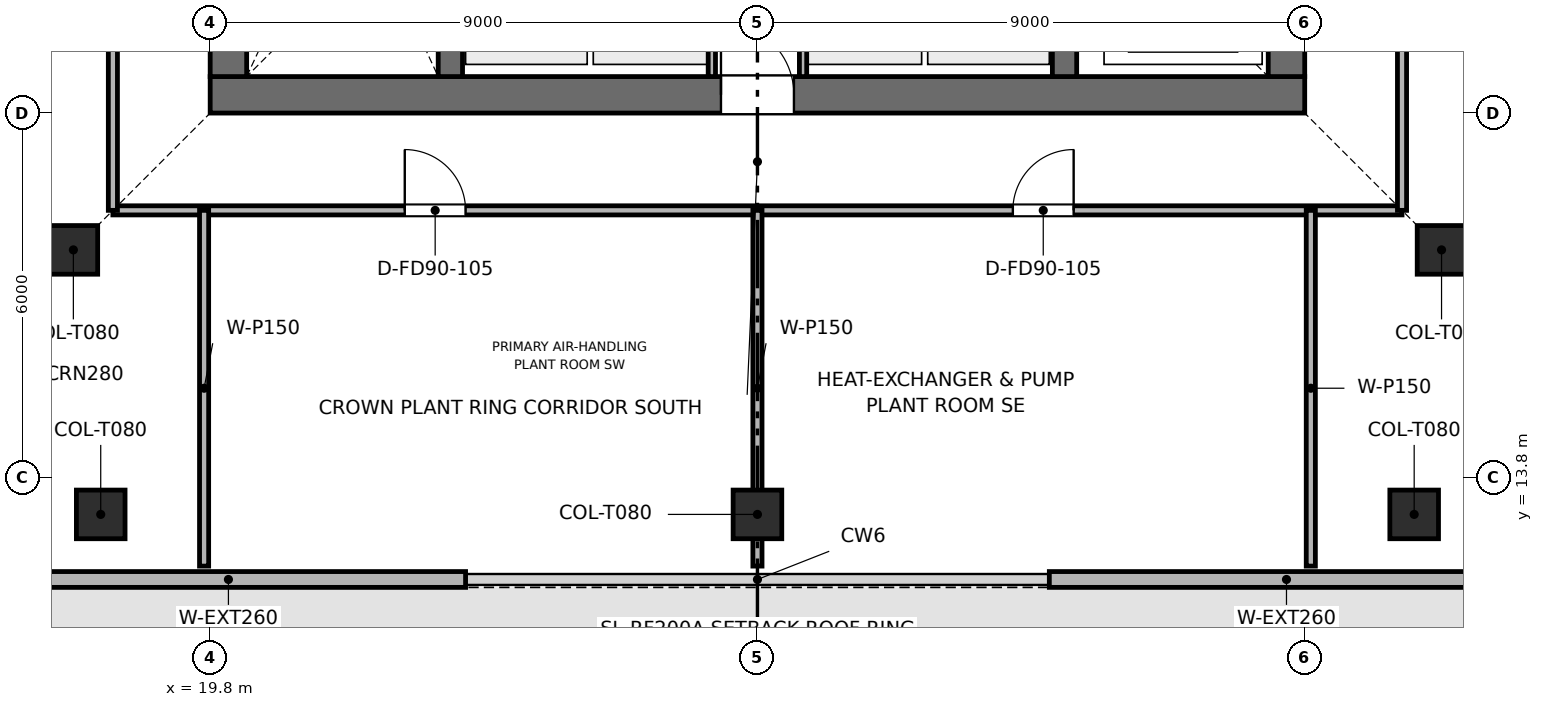
"""IFC4 building model, lengths in metres.
Left out: names, types, materials, properties, quantities, classifications, styles, units other than length and angle.
Written with IfcOpenShell. Run it as: python <this file> out.ifc"""

import sys

from ifc_helpers import new_model, si_unit, direction, frame, frame_2d, origin, origin_2d, place, context, subcontext, project, spatial, rectangle, extrude, element, fill, save


model = new_model("IFC4")
c1 = context("Model", 3, precision=1e-05, world=origin(), true_north=direction((0.0, 1.0)))
c2 = subcontext(c1, "Body", "Model", "MODEL_VIEW")
j1 = project(units=[si_unit("LENGTHUNIT", "METRE"), si_unit("PLANEANGLEUNIT", "RADIAN")], contexts=[c1])
p1 = place(None, origin())
s1 = spatial("IfcSite", under=j1, at=p1, CompositionType="ELEMENT")
p2 = place(p1, origin())
s2 = spatial("IfcBuilding", under=s1, at=p2, CompositionType="ELEMENT")
p3 = place(p2, frame((0.0, 0.0, 373.8)))
s3 = spatial("IfcBuildingStorey", under=s2, at=p3, CompositionType="ELEMENT", Elevation=373.8)
p4 = place(p3, frame((19.8, 20.1, 0.0), z_axis=(0.0, 0.0, 1.0), x_axis=(1.0, 0.0, 0.0)))
e1 = element("IfcWall", 1, at=p4, inside=s3, PredefinedType="SHEAR", context=c2, shape_type="SweptSolid", body=[
    extrude(rectangle(XDim=18.0, YDim=0.6, at=frame_2d((9.0, 0.0))), origin(), (0.0, 0.0, 1.0), 4.8),
])
p5 = place(p4, frame((8.4, 0.0, 0.0)))
e2 = element("IfcOpeningElement", 2, at=p5, cuts=e1, PredefinedType="OPENING", context=c2, shape_type="SweptSolid", body=[
    extrude(rectangle(XDim=1.2, YDim=2.2, at=frame_2d((0.6, 1.1))), frame((0.0, 0.31, 0.0), z_axis=(0.0, -1.0, 0.0), x_axis=(1.0, 0.0, 0.0)), (0.0, 0.0, 1.0), 0.62),
])
p6 = place(p3, frame((20.1, 20.4, 0.0), z_axis=(0.0, 0.0, 1.0), x_axis=(0.0, 1.0, 0.0)))
e3 = element("IfcWall", 3, at=p6, inside=s3, PredefinedType="SHEAR", context=c2, shape_type="SweptSolid", body=[
    extrude(rectangle(XDim=16.8, YDim=0.6, at=frame_2d((8.4, 0.0))), origin(), (0.0, 0.0, 1.0), 4.8),
])
p7 = place(p6, frame((10.4, 0.0, 0.0)))
e4 = element("IfcOpeningElement", 4, at=p7, cuts=e3, PredefinedType="OPENING", context=c2, shape_type="SweptSolid", body=[
    extrude(rectangle(XDim=1.1, YDim=2.15, at=frame_2d((0.55, 1.075))), frame((0.0, 0.31, 0.0), z_axis=(0.0, -1.0, 0.0), x_axis=(1.0, 0.0, 0.0)), (0.0, 0.0, 1.0), 0.62),
])
p8 = place(p3, frame((37.5, 20.4, 0.0), z_axis=(0.0, 0.0, 1.0), x_axis=(0.0, 1.0, 0.0)))
e5 = element("IfcWall", 5, at=p8, inside=s3, PredefinedType="SHEAR", context=c2, shape_type="SweptSolid", body=[
    extrude(rectangle(XDim=16.8, YDim=0.6, at=frame_2d((8.4, 0.0))), origin(), (0.0, 0.0, 1.0), 4.8),
])
p9 = place(p8, frame((4.9, 0.0, 0.0)))
e6 = element("IfcOpeningElement", 6, at=p9, cuts=e5, PredefinedType="OPENING", context=c2, shape_type="SweptSolid", body=[
    extrude(rectangle(XDim=1.1, YDim=2.15, at=frame_2d((0.55, 1.075))), frame((0.0, 0.31, 0.0), z_axis=(0.0, -1.0, 0.0), x_axis=(1.0, 0.0, 0.0)), (0.0, 0.0, 1.0), 0.62),
])
for number, where, z_axis, x_axis in (
    (7, (23.75, 20.4, 0.0), (0.0, 0.0, 1.0), (0.0, 1.0, 0.0)),
    (8, (33.85, 20.4, 0.0), (0.0, 0.0, 1.0), (0.0, 1.0, 0.0)),
):
    element("IfcWall", number, at=place(p3, frame(where, z_axis=z_axis, x_axis=x_axis)), inside=s3, PredefinedType="SHEAR", context=c2, shape_type="SweptSolid", body=[
        extrude(rectangle(XDim=16.8, YDim=0.4, at=frame_2d((8.4, 0.0))), origin(), (0.0, 0.0, 1.0), 4.8),
    ])
for number, where, z_axis, x_axis in (
    (9, (18.0, 13.2, 0.003), (0.0, 0.0, 1.0), (1.0, 0.0, 0.0)),
    (10, (28.8, 13.2, 0.003), (0.0, 0.0, 1.0), (1.0, 0.0, 0.0)),
    (11, (39.6, 13.2, 0.003), (0.0, 0.0, 1.0), (1.0, 0.0, 0.0)),
    (12, (17.55, 17.55, 0.003), (0.0, 0.0, 1.0), (1.0, 0.0, 0.0)),
    (13, (40.05, 17.55, 0.003), (0.0, 0.0, 1.0), (1.0, 0.0, 0.0)),
):
    element("IfcColumn", number, at=place(p3, frame(where, z_axis=z_axis, x_axis=x_axis)), inside=s3, PredefinedType="COLUMN", context=c2, shape_type="SweptSolid", body=[
        extrude(rectangle(XDim=0.8, YDim=0.8, at=origin_2d()), origin(), (0.0, 0.0, 1.0), 4.494),
    ])
p10 = place(p3, frame((41.4, 12.13, 0.0), z_axis=(0.0, 0.0, 1.0), x_axis=(-1.0, 0.0, 0.0)))
e14 = element("IfcWall", 14, at=p10, inside=s3, PredefinedType="SOLIDWALL", context=c2, shape_type="SweptSolid", body=[
    extrude(rectangle(XDim=7.8, YDim=0.26, at=frame_2d((3.9, 0.0))), origin(), (0.0, 0.0, 1.0), 4.5),
])
p11 = place(p3, frame((24.0, 12.13, 0.0), z_axis=(0.0, 0.0, 1.0), x_axis=(-1.0, 0.0, 0.0)))
e15 = element("IfcWall", 15, at=p11, inside=s3, PredefinedType="SOLIDWALL", context=c2, shape_type="SweptSolid", body=[
    extrude(rectangle(XDim=7.8, YDim=0.26, at=frame_2d((3.9, 0.0))), origin(), (0.0, 0.0, 1.0), 4.5),
])
p12 = place(p3, frame((28.05, 20.4, 0.0), z_axis=(0.0, 0.0, 1.0), x_axis=(0.0, 1.0, 0.0)))
e16 = element("IfcWall", 16, at=p12, inside=s3, PredefinedType="PARTITIONING", context=c2, shape_type="SweptSolid", body=[
    extrude(rectangle(XDim=8.15, YDim=0.12, at=frame_2d((4.075, 0.0))), origin(), (0.0, 0.0, 1.0), 4.5),
])
p13 = place(p3, frame((29.55, 20.4, 0.0), z_axis=(0.0, 0.0, 1.0), x_axis=(0.0, 1.0, 0.0)))
e17 = element("IfcWall", 17, at=p13, inside=s3, PredefinedType="PARTITIONING", context=c2, shape_type="SweptSolid", body=[
    extrude(rectangle(XDim=2.75, YDim=0.12, at=frame_2d((1.375, 0.0))), origin(), (0.0, 0.0, 1.0), 4.5),
])
p14 = place(p3, frame((18.2, 18.2, 0.0), z_axis=(0.0, 0.0, 1.0), x_axis=(1.0, 0.0, 0.0)))
e18 = element("IfcWall", 18, at=p14, inside=s3, PredefinedType="PARTITIONING", context=c2, shape_type="SweptSolid", body=[
    extrude(rectangle(XDim=21.2, YDim=0.15, at=frame_2d((10.6, 0.0))), origin(), (0.0, 0.0, 1.0), 4.035),
])
p15 = place(p14, frame((4.8, 0.0, 0.0)))
e19 = element("IfcOpeningElement", 19, at=p15, cuts=e18, PredefinedType="OPENING", context=c2, shape_type="SweptSolid", body=[
    extrude(rectangle(XDim=1.0, YDim=2.15, at=frame_2d((0.5, 1.075))), frame((0.0, 0.085, 0.0), z_axis=(0.0, -1.0, 0.0), x_axis=(1.0, 0.0, 0.0)), (0.0, 0.0, 1.0), 0.17),
])
p16 = place(p14, frame((14.8, 0.0, 0.0)))
e20 = element("IfcOpeningElement", 20, at=p16, cuts=e18, PredefinedType="OPENING", context=c2, shape_type="SweptSolid", body=[
    extrude(rectangle(XDim=1.0, YDim=2.15, at=frame_2d((0.5, 1.075))), frame((0.0, 0.085, 0.0), z_axis=(0.0, -1.0, 0.0), x_axis=(1.0, 0.0, 0.0)), (0.0, 0.0, 1.0), 0.17),
])
for number, where, z_axis, x_axis in (
    (21, (18.2, 18.2, 0.0), (0.0, 0.0, 1.0), (0.0, 1.0, 0.0)),
    (22, (39.4, 18.2, 0.0), (0.0, 0.0, 1.0), (0.0, 1.0, 0.0)),
):
    element("IfcWall", number, at=place(p3, frame(where, z_axis=z_axis, x_axis=x_axis)), inside=s3, PredefinedType="PARTITIONING", context=c2, shape_type="SweptSolid", body=[
        extrude(rectangle(XDim=21.2, YDim=0.15, at=frame_2d((10.6, 0.0))), origin(), (0.0, 0.0, 1.0), 4.035),
    ])
p17 = place(p3, frame((19.7, 12.35, 0.0), z_axis=(0.0, 0.0, 1.0), x_axis=(0.0, 1.0, 0.0)))
e23 = element("IfcWall", 23, at=p17, inside=s3, PredefinedType="PARTITIONING", context=c2, shape_type="SweptSolid", body=[
    extrude(rectangle(XDim=5.85, YDim=0.15, at=frame_2d((2.925, 0.0))), origin(), (0.0, 0.0, 1.0), 4.185),
])
p18 = place(p3, frame((28.8, 12.35, 0.0), z_axis=(0.0, 0.0, 1.0), x_axis=(0.0, 1.0, 0.0)))
e24 = element("IfcWall", 24, at=p18, inside=s3, PredefinedType="PARTITIONING", context=c2, shape_type="SweptSolid", body=[
    extrude(rectangle(XDim=5.85, YDim=0.15, at=frame_2d((2.925, 0.0))), origin(), (0.0, 0.0, 1.0), 4.035),
])
p19 = place(p3, frame((37.9, 12.35, 0.0), z_axis=(0.0, 0.0, 1.0), x_axis=(0.0, 1.0, 0.0)))
e25 = element("IfcWall", 25, at=p19, inside=s3, PredefinedType="PARTITIONING", context=c2, shape_type="SweptSolid", body=[
    extrude(rectangle(XDim=5.85, YDim=0.15, at=frame_2d((2.925, 0.0))), origin(), (0.0, 0.0, 1.0), 4.185),
])
p20 = place(p15, origin())
e26 = element("IfcDoor", 26, at=p20, inside=s3, OperationType="SINGLE_SWING_LEFT", PredefinedType="DOOR", context=c2, shape_type="SweptSolid", body=[
    extrude(rectangle(XDim=1.0, YDim=2.15, at=frame_2d((0.5, 1.075))), frame((0.0, 0.025, 0.0), z_axis=(0.0, -1.0, 0.0), x_axis=(1.0, 0.0, 0.0)), (0.0, 0.0, 1.0), 0.05),
])
fill(e19, e26)
p21 = place(p16, origin())
e27 = element("IfcDoor", 27, at=p21, inside=s3, OperationType="SINGLE_SWING_RIGHT", PredefinedType="DOOR", context=c2, shape_type="SweptSolid", body=[
    extrude(rectangle(XDim=1.0, YDim=2.15, at=frame_2d((0.5, 1.075))), frame((0.0, 0.025, 0.0), z_axis=(0.0, -1.0, 0.0), x_axis=(1.0, 0.0, 0.0)), (0.0, 0.0, 1.0), 0.05),
])
fill(e20, e27)
p22 = place(p5, origin())
e28 = element("IfcDoor", 28, at=p22, inside=s3, OperationType="SINGLE_SWING_LEFT", PredefinedType="DOOR", context=c2, shape_type="SweptSolid", body=[
    extrude(rectangle(XDim=1.2, YDim=2.2, at=frame_2d((0.6, 1.1))), frame((0.0, 0.025, 0.0), z_axis=(0.0, -1.0, 0.0), x_axis=(1.0, 0.0, 0.0)), (0.0, 0.0, 1.0), 0.05),
])
fill(e2, e28)
save(model, sys.argv[1])
